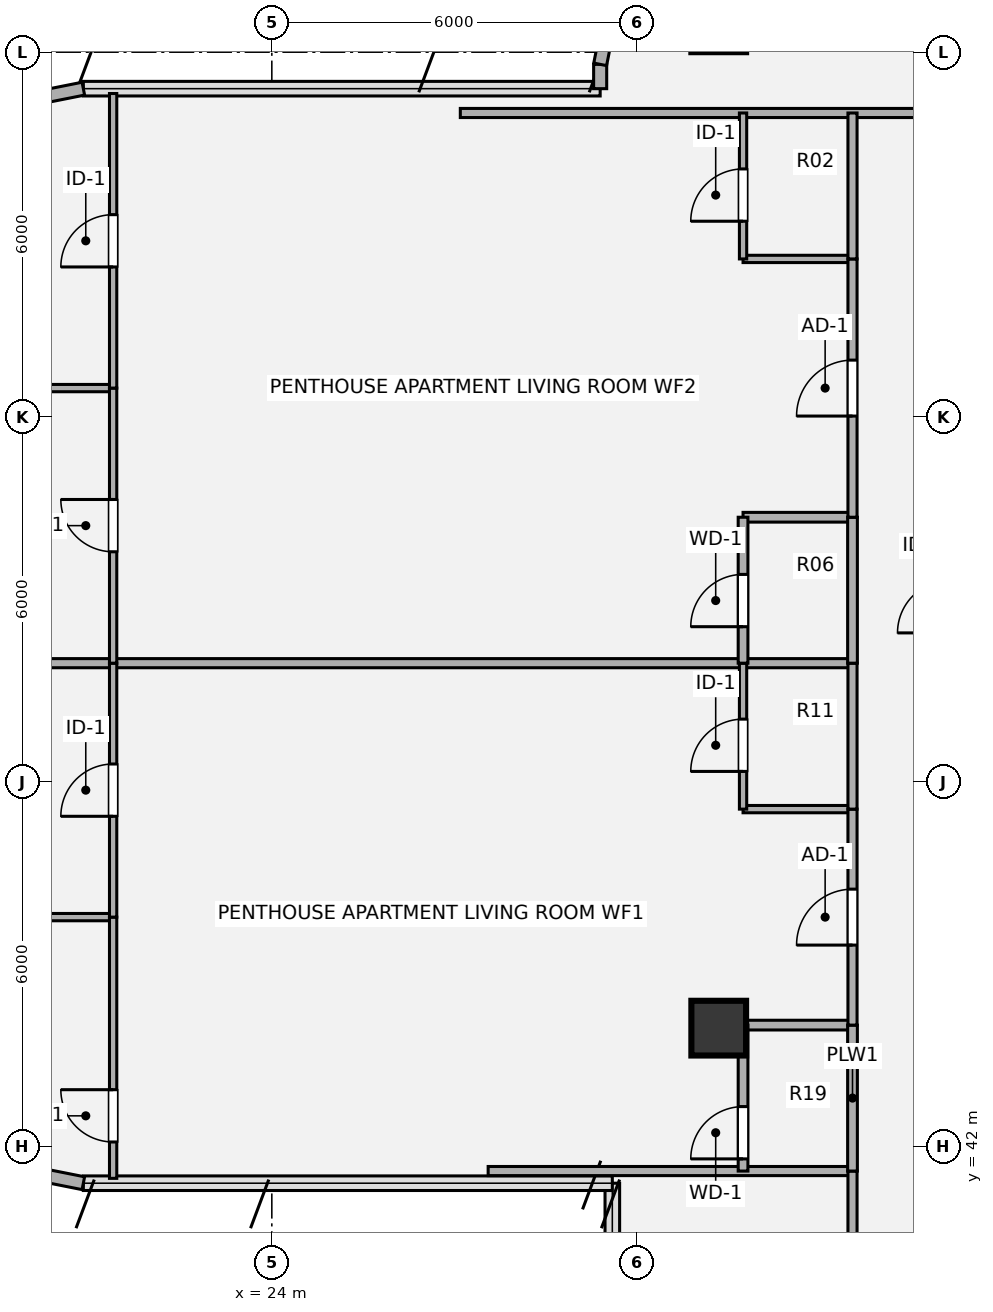
"""IFC4 building model, lengths in metres.
Left out: names, types, materials, properties, quantities, classifications, styles, units other than length and angle.
Written with IfcOpenShell. Run it as: python <this file> out.ifc"""

import sys

from ifc_helpers import new_model, si_unit, direction, frame, frame_2d, origin, origin_2d, place, context, subcontext, project, spatial, rectangle, hollow_circle, extrude, source, transform, mapped, element, fill, save


model = new_model("IFC4")
c1 = context("Model", 3, precision=1e-05, world=origin(), true_north=direction((0.0, 1.0)))
c2 = subcontext(c1, "Body", "Model", "MODEL_VIEW")
j1 = project(units=[si_unit("LENGTHUNIT", "METRE"), si_unit("PLANEANGLEUNIT", "RADIAN")], contexts=[c1])
p1 = place(None, origin())
s1 = spatial("IfcSite", under=j1, at=p1, CompositionType="ELEMENT")
p2 = place(p1, origin())
s2 = spatial("IfcBuilding", under=s1, at=p2, CompositionType="ELEMENT")
p3 = place(p2, frame((0.0, 0.0, 226.8)))
s3 = spatial("IfcBuildingStorey", under=s2, at=p3, CompositionType="ELEMENT", Elevation=226.8)
m1 = source(origin(), c2, "Body", "SweptSolid", [
    extrude(hollow_circle(Radius=0.45, WallThickness=0.032, at=origin_2d()), origin(), (0.0, 0.0, 1.0), 3.78),
])
p4 = place(p3, frame((31.35, 43.95, 0.0), z_axis=(0.0, 0.0, 1.0), x_axis=(1.0, 0.0, 0.0)))
e1 = element("IfcColumn", 1, at=p4, inside=s3, PredefinedType="COLUMN", context=c2, shape_type="MappedRepresentation", body=[
    mapped(m1, transform((0.0, 0.0, 0.0), x_axis=(1.0, 0.0, 0.0), y_axis=(0.0, 1.0, 0.0), z_axis=(0.0, 0.0, 1.0), scale=1.0)),
])
for number, where, z_axis, x_axis in (
    (2, (20.9, 41.4, 0.0), (0.0, 0.0, 1.0), (-0.981, 0.195, 0.0)),
    (3, (19.675, 59.156, 0.0), (0.0, 0.0, 1.0), (0.981, 0.195, 0.0)),
):
    element("IfcWall", number, at=place(p3, frame(where, z_axis=z_axis, x_axis=x_axis)), inside=s3, PredefinedType="SOLIDWALL", context=c2, shape_type="SweptSolid", body=[
        extrude(rectangle(XDim=1.249, YDim=0.215, at=frame_2d((0.624, 0.0))), origin(), (0.0, 0.0, 1.0), 3.53),
    ])
p5 = place(p3, frame((29.4, 59.4, 0.0), z_axis=(0.0, 0.0, 1.0), x_axis=(0.0, 1.0, 0.0)))
e4 = element("IfcWall", 4, at=p5, inside=s3, PredefinedType="SOLIDWALL", context=c2, shape_type="SweptSolid", body=[
    extrude(rectangle(XDim=0.4, YDim=0.215, at=frame_2d((0.2, 0.0))), origin(), (0.0, 0.0, 1.0), 3.53),
])
p6 = place(p3, frame((29.4, 59.8, 0.0), z_axis=(0.0, 0.0, 1.0), x_axis=(0.195190360752, 0.980765376158, 0.0)))
e5 = element("IfcWall", 5, at=p6, inside=s3, PredefinedType="SOLIDWALL", context=c2, shape_type="SweptSolid", body=[
    extrude(rectangle(XDim=1.014, YDim=0.215, at=frame_2d((0.507, 0.0))), origin(), (0.0, 0.0, 1.0), 3.53),
])
p7 = place(p3, frame((27.558, 41.6, 0.0), z_axis=(0.0, 0.0, 1.0), x_axis=(1.0, 0.0, 0.0)))
e6 = element("IfcWall", 6, at=p7, inside=s3, PredefinedType="PARTITIONING", context=c2, shape_type="SweptSolid", body=[
    extrude(rectangle(XDim=5.992, YDim=0.15, at=frame_2d((2.996, 0.0))), origin(), (0.0, 0.0, 1.0), 3.5),
])
p8 = place(p3, frame((31.75, 44.0, 0.0), z_axis=(0.0, 0.0, 1.0), x_axis=(1.0, 0.0, 0.0)))
e7 = element("IfcWall", 7, at=p8, inside=s3, PredefinedType="PLUMBINGWALL", context=c2, shape_type="SweptSolid", body=[
    extrude(rectangle(XDim=1.8, YDim=0.16, at=frame_2d((0.9, 0.0))), origin(), (0.0, 0.0, 1.0), 2.903),
])
p9 = place(p3, frame((17.78, 45.776, 0.0), z_axis=(0.0, 0.0, 1.0), x_axis=(1.0, 0.0, 0.0)))
e8 = element("IfcWall", 8, at=p9, inside=s3, PredefinedType="PARTITIONING", context=c2, shape_type="SweptSolid", body=[
    extrude(rectangle(XDim=3.61, YDim=0.12, at=frame_2d((1.805, 0.0))), origin(), (0.0, 0.0, 1.0), 2.982),
])
p10 = place(p3, frame((31.75, 47.552, 0.0), z_axis=(0.0, 0.0, 1.0), x_axis=(1.0, 0.0, 0.0)))
e9 = element("IfcWall", 9, at=p10, inside=s3, PredefinedType="PARTITIONING", context=c2, shape_type="SweptSolid", body=[
    extrude(rectangle(XDim=1.8, YDim=0.12, at=frame_2d((0.9, 0.0))), origin(), (0.0, 0.0, 1.0), 3.259),
])
p11 = place(p3, frame((17.78, 49.952, 0.0), z_axis=(0.0, 0.0, 1.0), x_axis=(1.0, 0.0, 0.0)))
e10 = element("IfcWall", 10, at=p11, inside=s3, PredefinedType="PARTITIONING", context=c2, shape_type="SweptSolid", body=[
    extrude(rectangle(XDim=15.77, YDim=0.15, at=frame_2d((7.885, 0.0))), origin(), (0.0, 0.0, 1.0), 2.982),
])
p12 = place(p3, frame((31.75, 52.352, 0.0), z_axis=(0.0, 0.0, 1.0), x_axis=(1.0, 0.0, 0.0)))
e11 = element("IfcWall", 11, at=p12, inside=s3, PredefinedType="PLUMBINGWALL", context=c2, shape_type="SweptSolid", body=[
    extrude(rectangle(XDim=1.8, YDim=0.16, at=frame_2d((0.9, 0.0))), origin(), (0.0, 0.0, 1.0), 3.259),
])
p13 = place(p3, frame((17.78, 54.476, 0.0), z_axis=(0.0, 0.0, 1.0), x_axis=(1.0, 0.0, 0.0)))
e12 = element("IfcWall", 12, at=p13, inside=s3, PredefinedType="PARTITIONING", context=c2, shape_type="SweptSolid", body=[
    extrude(rectangle(XDim=3.61, YDim=0.12, at=frame_2d((1.805, 0.0))), origin(), (0.0, 0.0, 1.0), 2.903),
])
p14 = place(p3, frame((31.75, 56.6, 0.0), z_axis=(0.0, 0.0, 1.0), x_axis=(1.0, 0.0, 0.0)))
e13 = element("IfcWall", 13, at=p14, inside=s3, PredefinedType="PARTITIONING", context=c2, shape_type="SweptSolid", body=[
    extrude(rectangle(XDim=1.8, YDim=0.12, at=frame_2d((0.9, 0.0))), origin(), (0.0, 0.0, 1.0), 3.259),
])
p15 = place(p3, frame((27.1, 59.0, 0.0), z_axis=(0.0, 0.0, 1.0), x_axis=(1.0, 0.0, 0.0)))
e14 = element("IfcWall", 14, at=p15, inside=s3, PredefinedType="PARTITIONING", context=c2, shape_type="SweptSolid", body=[
    extrude(rectangle(XDim=17.8, YDim=0.15, at=frame_2d((8.9, 0.0))), origin(), (0.0, 0.0, 1.0), 3.308),
])
p16 = place(p15, frame((8.375, 0.0, 0.0)))
e15 = element("IfcOpeningElement", 15, at=p16, cuts=e14, PredefinedType="OPENING", context=c2, shape_type="SweptSolid", body=[
    extrude(rectangle(XDim=1.05, YDim=2.1, at=origin_2d()), frame((0.525, 0.085, 1.05), z_axis=(0.0, -1.0, 0.0), x_axis=(1.0, 0.0, 0.0)), (0.0, 0.0, 1.0), 0.17),
])
p17 = place(p3, frame((21.39, 41.48, 0.0), z_axis=(0.0, 0.0, 1.0), x_axis=(0.0, 1.0, 0.0)))
e16 = element("IfcWall", 16, at=p17, inside=s3, PredefinedType="PARTITIONING", context=c2, shape_type="SweptSolid", body=[
    extrude(rectangle(XDim=4.296, YDim=0.12, at=frame_2d((2.148, 0.0))), origin(), (0.0, 0.0, 1.0), 3.5),
])
p18 = place(p17, frame((0.598, 0.0, 0.0)))
e17 = element("IfcOpeningElement", 17, at=p18, cuts=e16, PredefinedType="OPENING", context=c2, shape_type="SweptSolid", body=[
    extrude(rectangle(XDim=0.86, YDim=2.1, at=origin_2d()), frame((0.43, 0.07, 1.05), z_axis=(0.0, -1.0, 0.0), x_axis=(1.0, 0.0, 0.0)), (0.0, 0.0, 1.0), 0.14),
])
p19 = place(p3, frame((21.39, 45.776, 0.0), z_axis=(0.0, 0.0, 1.0), x_axis=(0.0, 1.0, 0.0)))
e18 = element("IfcWall", 18, at=p19, inside=s3, PredefinedType="PARTITIONING", context=c2, shape_type="SweptSolid", body=[
    extrude(rectangle(XDim=4.176, YDim=0.12, at=frame_2d((2.088, 0.0))), origin(), (0.0, 0.0, 1.0), 3.5),
])
p20 = place(p19, frame((1.658, 0.0, 0.0)))
e19 = element("IfcOpeningElement", 19, at=p20, cuts=e18, PredefinedType="OPENING", context=c2, shape_type="SweptSolid", body=[
    extrude(rectangle(XDim=0.86, YDim=2.1, at=origin_2d()), frame((0.43, 0.07, 1.05), z_axis=(0.0, -1.0, 0.0), x_axis=(1.0, 0.0, 0.0)), (0.0, 0.0, 1.0), 0.14),
])
p21 = place(p3, frame((21.39, 49.952, 0.0), z_axis=(0.0, 0.0, 1.0), x_axis=(0.0, 1.0, 0.0)))
e20 = element("IfcWall", 20, at=p21, inside=s3, PredefinedType="PARTITIONING", context=c2, shape_type="SweptSolid", body=[
    extrude(rectangle(XDim=4.524, YDim=0.12, at=frame_2d((2.262, 0.0))), origin(), (0.0, 0.0, 1.0), 3.5),
])
p22 = place(p21, frame((1.832, 0.0, 0.0)))
e21 = element("IfcOpeningElement", 21, at=p22, cuts=e20, PredefinedType="OPENING", context=c2, shape_type="SweptSolid", body=[
    extrude(rectangle(XDim=0.86, YDim=2.1, at=origin_2d()), frame((0.43, 0.07, 1.05), z_axis=(0.0, -1.0, 0.0), x_axis=(1.0, 0.0, 0.0)), (0.0, 0.0, 1.0), 0.14),
])
p23 = place(p3, frame((21.39, 54.476, 0.0), z_axis=(0.0, 0.0, 1.0), x_axis=(0.0, 1.0, 0.0)))
e22 = element("IfcWall", 22, at=p23, inside=s3, PredefinedType="PARTITIONING", context=c2, shape_type="SweptSolid", body=[
    extrude(rectangle(XDim=4.844, YDim=0.12, at=frame_2d((2.422, 0.0))), origin(), (0.0, 0.0, 1.0), 3.5),
])
p24 = place(p23, frame((1.992, 0.0, 0.0)))
e23 = element("IfcOpeningElement", 23, at=p24, cuts=e22, PredefinedType="OPENING", context=c2, shape_type="SweptSolid", body=[
    extrude(rectangle(XDim=0.86, YDim=2.1, at=origin_2d()), frame((0.43, 0.07, 1.05), z_axis=(0.0, -1.0, 0.0), x_axis=(1.0, 0.0, 0.0)), (0.0, 0.0, 1.0), 0.14),
])
p25 = place(p3, frame((31.75, 41.6, 0.0), z_axis=(0.0, 0.0, 1.0), x_axis=(0.0, 1.0, 0.0)))
e24 = element("IfcWall", 24, at=p25, inside=s3, PredefinedType="PLUMBINGWALL", context=c2, shape_type="SweptSolid", body=[
    extrude(rectangle(XDim=2.4, YDim=0.16, at=frame_2d((1.2, 0.0))), origin(), (0.0, 0.0, 1.0), 3.5),
])
p26 = place(p25, frame((0.2, 0.0, 0.0)))
e25 = element("IfcOpeningElement", 25, at=p26, cuts=e24, PredefinedType="OPENING", context=c2, shape_type="SweptSolid", body=[
    extrude(rectangle(XDim=0.86, YDim=2.1, at=origin_2d()), frame((0.43, 0.09, 1.05), z_axis=(0.0, -1.0, 0.0), x_axis=(1.0, 0.0, 0.0)), (0.0, 0.0, 1.0), 0.18),
])
p27 = place(p3, frame((31.75, 47.552, 0.0), z_axis=(0.0, 0.0, 1.0), x_axis=(0.0, 1.0, 0.0)))
e26 = element("IfcWall", 26, at=p27, inside=s3, PredefinedType="PARTITIONING", context=c2, shape_type="SweptSolid", body=[
    extrude(rectangle(XDim=2.4, YDim=0.12, at=frame_2d((1.2, 0.0))), origin(), (0.0, 0.0, 1.0), 3.5),
])
p28 = place(p27, frame((0.62, 0.0, 0.0)))
e27 = element("IfcOpeningElement", 27, at=p28, cuts=e26, PredefinedType="OPENING", context=c2, shape_type="SweptSolid", body=[
    extrude(rectangle(XDim=0.86, YDim=2.1, at=origin_2d()), frame((0.43, 0.07, 1.05), z_axis=(0.0, -1.0, 0.0), x_axis=(1.0, 0.0, 0.0)), (0.0, 0.0, 1.0), 0.14),
])
p29 = place(p3, frame((31.75, 49.952, 0.0), z_axis=(0.0, 0.0, 1.0), x_axis=(0.0, 1.0, 0.0)))
e28 = element("IfcWall", 28, at=p29, inside=s3, PredefinedType="PLUMBINGWALL", context=c2, shape_type="SweptSolid", body=[
    extrude(rectangle(XDim=2.4, YDim=0.16, at=frame_2d((1.2, 0.0))), origin(), (0.0, 0.0, 1.0), 3.5),
])
p30 = place(p29, frame((0.6, 0.0, 0.0)))
e29 = element("IfcOpeningElement", 29, at=p30, cuts=e28, PredefinedType="OPENING", context=c2, shape_type="SweptSolid", body=[
    extrude(rectangle(XDim=0.86, YDim=2.1, at=origin_2d()), frame((0.43, 0.09, 1.05), z_axis=(0.0, -1.0, 0.0), x_axis=(1.0, 0.0, 0.0)), (0.0, 0.0, 1.0), 0.18),
])
p31 = place(p3, frame((31.75, 56.6, 0.0), z_axis=(0.0, 0.0, 1.0), x_axis=(0.0, 1.0, 0.0)))
e30 = element("IfcWall", 30, at=p31, inside=s3, PredefinedType="PARTITIONING", context=c2, shape_type="SweptSolid", body=[
    extrude(rectangle(XDim=2.4, YDim=0.12, at=frame_2d((1.2, 0.0))), origin(), (0.0, 0.0, 1.0), 3.5),
])
p32 = place(p31, frame((0.62, 0.0, 0.0)))
e31 = element("IfcOpeningElement", 31, at=p32, cuts=e30, PredefinedType="OPENING", context=c2, shape_type="SweptSolid", body=[
    extrude(rectangle(XDim=0.86, YDim=2.1, at=origin_2d()), frame((0.43, 0.07, 1.05), z_axis=(0.0, -1.0, 0.0), x_axis=(1.0, 0.0, 0.0)), (0.0, 0.0, 1.0), 0.14),
])
p33 = place(p3, frame((33.55, 21.2, 0.0), z_axis=(0.0, 0.0, 1.0), x_axis=(0.0, 1.0, 0.0)))
e32 = element("IfcWall", 32, at=p33, inside=s3, PredefinedType="PARTITIONING", context=c2, shape_type="SweptSolid", body=[
    extrude(rectangle(XDim=20.4, YDim=0.15, at=frame_2d((10.2, 0.0))), origin(), (0.0, 0.0, 1.0), 3.5),
])
p34 = place(p33, frame((9.64, 0.0, 0.0)))
e33 = element("IfcOpeningElement", 33, at=p34, cuts=e32, PredefinedType="OPENING", context=c2, shape_type="SweptSolid", body=[
    extrude(rectangle(XDim=0.86, YDim=2.1, at=origin_2d()), frame((0.43, 0.085, 1.05), z_axis=(0.0, -1.0, 0.0), x_axis=(1.0, 0.0, 0.0)), (0.0, 0.0, 1.0), 0.17),
])
p35 = place(p3, frame((33.55, 41.6, 0.0), z_axis=(0.0, 0.0, 1.0), x_axis=(0.0, 1.0, 0.0)))
e34 = element("IfcWall", 34, at=p35, inside=s3, PredefinedType="PLUMBINGWALL", context=c2, shape_type="SweptSolid", body=[
    extrude(rectangle(XDim=2.4, YDim=0.16, at=frame_2d((1.2, 0.0))), origin(), (0.0, 0.0, 1.0), 3.5),
])
p36 = place(p3, frame((33.55, 44.0, 0.0), z_axis=(0.0, 0.0, 1.0), x_axis=(0.0, 1.0, 0.0)))
e35 = element("IfcWall", 35, at=p36, inside=s3, PredefinedType="PARTITIONING", context=c2, shape_type="SweptSolid", body=[
    extrude(rectangle(XDim=3.552, YDim=0.15, at=frame_2d((1.776, 0.0))), origin(), (0.0, 0.0, 1.0), 3.5),
])
p37 = place(p36, frame((1.316, 0.0, 0.0)))
e36 = element("IfcOpeningElement", 36, at=p37, cuts=e35, PredefinedType="OPENING", context=c2, shape_type="SweptSolid", body=[
    extrude(rectangle(XDim=0.92, YDim=2.1, at=origin_2d()), frame((0.46, 0.085, 1.05), z_axis=(0.0, -1.0, 0.0), x_axis=(1.0, 0.0, 0.0)), (0.0, 0.0, 1.0), 0.17),
])
p38 = place(p3, frame((33.55, 47.552, 0.0), z_axis=(0.0, 0.0, 1.0), x_axis=(0.0, 1.0, 0.0)))
e37 = element("IfcWall", 37, at=p38, inside=s3, PredefinedType="PARTITIONING", context=c2, shape_type="SweptSolid", body=[
    extrude(rectangle(XDim=2.4, YDim=0.15, at=frame_2d((1.2, 0.0))), origin(), (0.0, 0.0, 1.0), 3.5),
])
p39 = place(p3, frame((33.55, 49.952, 0.0), z_axis=(0.0, 0.0, 1.0), x_axis=(0.0, 1.0, 0.0)))
e38 = element("IfcWall", 38, at=p39, inside=s3, PredefinedType="PLUMBINGWALL", context=c2, shape_type="SweptSolid", body=[
    extrude(rectangle(XDim=2.4, YDim=0.16, at=frame_2d((1.2, 0.0))), origin(), (0.0, 0.0, 1.0), 3.5),
])
p40 = place(p3, frame((33.55, 52.352, 0.0), z_axis=(0.0, 0.0, 1.0), x_axis=(0.0, 1.0, 0.0)))
e39 = element("IfcWall", 39, at=p40, inside=s3, PredefinedType="PARTITIONING", context=c2, shape_type="SweptSolid", body=[
    extrude(rectangle(XDim=4.248, YDim=0.15, at=frame_2d((2.124, 0.0))), origin(), (0.0, 0.0, 1.0), 3.5),
])
p41 = place(p40, frame((1.664, 0.0, 0.0)))
e40 = element("IfcOpeningElement", 40, at=p41, cuts=e39, PredefinedType="OPENING", context=c2, shape_type="SweptSolid", body=[
    extrude(rectangle(XDim=0.92, YDim=2.1, at=origin_2d()), frame((0.46, 0.085, 1.05), z_axis=(0.0, -1.0, 0.0), x_axis=(1.0, 0.0, 0.0)), (0.0, 0.0, 1.0), 0.17),
])
p42 = place(p3, frame((33.55, 56.6, 0.0), z_axis=(0.0, 0.0, 1.0), x_axis=(0.0, 1.0, 0.0)))
e41 = element("IfcWall", 41, at=p42, inside=s3, PredefinedType="PARTITIONING", context=c2, shape_type="SweptSolid", body=[
    extrude(rectangle(XDim=2.4, YDim=0.15, at=frame_2d((1.2, 0.0))), origin(), (0.0, 0.0, 1.0), 3.5),
])
m2 = source(origin(), c2, "Body", "SweptSolid", [
    extrude(rectangle(XDim=0.86, YDim=2.1, at=origin_2d()), frame((0.43, 0.025, 1.05), z_axis=(0.0, -1.0, 0.0), x_axis=(1.0, 0.0, 0.0)), (0.0, 0.0, 1.0), 0.05),
])
p43 = place(p18, origin())
e42 = element("IfcDoor", 42, at=p43, inside=s3, OperationType="SINGLE_SWING_RIGHT", PredefinedType="DOOR", context=c2, shape_type="MappedRepresentation", body=[
    mapped(m2, transform((0.0, 0.0, 0.0), x_axis=(1.0, 0.0, 0.0), y_axis=(0.0, 1.0, 0.0), z_axis=(0.0, 0.0, 1.0), scale=1.0)),
])
fill(e17, e42)
p44 = place(p20, origin())
e43 = element("IfcDoor", 43, at=p44, inside=s3, OperationType="SINGLE_SWING_LEFT", PredefinedType="DOOR", context=c2, shape_type="MappedRepresentation", body=[
    mapped(m2, transform((0.0, 0.0, 0.0), x_axis=(1.0, 0.0, 0.0), y_axis=(0.0, 1.0, 0.0), z_axis=(0.0, 0.0, 1.0), scale=1.0)),
])
fill(e19, e43)
p45 = place(p22, origin())
e44 = element("IfcDoor", 44, at=p45, inside=s3, OperationType="SINGLE_SWING_RIGHT", PredefinedType="DOOR", context=c2, shape_type="MappedRepresentation", body=[
    mapped(m2, transform((0.0, 0.0, 0.0), x_axis=(1.0, 0.0, 0.0), y_axis=(0.0, 1.0, 0.0), z_axis=(0.0, 0.0, 1.0), scale=1.0)),
])
fill(e21, e44)
p46 = place(p24, origin())
e45 = element("IfcDoor", 45, at=p46, inside=s3, OperationType="SINGLE_SWING_LEFT", PredefinedType="DOOR", context=c2, shape_type="MappedRepresentation", body=[
    mapped(m2, transform((0.0, 0.0, 0.0), x_axis=(1.0, 0.0, 0.0), y_axis=(0.0, 1.0, 0.0), z_axis=(0.0, 0.0, 1.0), scale=1.0)),
])
fill(e23, e45)
m3 = source(origin(), c2, "Body", "SweptSolid", [
    extrude(rectangle(XDim=0.86, YDim=2.1, at=origin_2d()), frame((0.43, 0.025, 1.05), z_axis=(0.0, -1.0, 0.0), x_axis=(1.0, 0.0, 0.0)), (0.0, 0.0, 1.0), 0.05),
])
p47 = place(p26, origin())
e46 = element("IfcDoor", 46, at=p47, inside=s3, OperationType="SINGLE_SWING_LEFT", PredefinedType="DOOR", context=c2, shape_type="MappedRepresentation", body=[
    mapped(m3, transform((0.0, 0.0, 0.0), x_axis=(1.0, 0.0, 0.0), y_axis=(0.0, 1.0, 0.0), z_axis=(0.0, 0.0, 1.0), scale=1.0)),
])
fill(e25, e46)
p48 = place(p28, origin())
e47 = element("IfcDoor", 47, at=p48, inside=s3, OperationType="SINGLE_SWING_LEFT", PredefinedType="DOOR", context=c2, shape_type="MappedRepresentation", body=[
    mapped(m2, transform((0.0, 0.0, 0.0), x_axis=(1.0, 0.0, 0.0), y_axis=(0.0, 1.0, 0.0), z_axis=(0.0, 0.0, 1.0), scale=1.0)),
])
fill(e27, e47)
p49 = place(p30, origin())
e48 = element("IfcDoor", 48, at=p49, inside=s3, OperationType="SINGLE_SWING_LEFT", PredefinedType="DOOR", context=c2, shape_type="MappedRepresentation", body=[
    mapped(m3, transform((0.0, 0.0, 0.0), x_axis=(1.0, 0.0, 0.0), y_axis=(0.0, 1.0, 0.0), z_axis=(0.0, 0.0, 1.0), scale=1.0)),
])
fill(e29, e48)
p50 = place(p32, origin())
e49 = element("IfcDoor", 49, at=p50, inside=s3, OperationType="SINGLE_SWING_LEFT", PredefinedType="DOOR", context=c2, shape_type="MappedRepresentation", body=[
    mapped(m2, transform((0.0, 0.0, 0.0), x_axis=(1.0, 0.0, 0.0), y_axis=(0.0, 1.0, 0.0), z_axis=(0.0, 0.0, 1.0), scale=1.0)),
])
fill(e31, e49)
m4 = source(origin(), c2, "Body", "SweptSolid", [
    extrude(rectangle(XDim=0.92, YDim=2.1, at=origin_2d()), frame((0.46, 0.025, 1.05), z_axis=(0.0, -1.0, 0.0), x_axis=(1.0, 0.0, 0.0)), (0.0, 0.0, 1.0), 0.05),
])
p51 = place(p37, origin())
e50 = element("IfcDoor", 50, at=p51, inside=s3, OperationType="SINGLE_SWING_LEFT", PredefinedType="DOOR", context=c2, shape_type="MappedRepresentation", body=[
    mapped(m4, transform((0.0, 0.0, 0.0), x_axis=(1.0, 0.0, 0.0), y_axis=(0.0, 1.0, 0.0), z_axis=(0.0, 0.0, 1.0), scale=1.0)),
])
fill(e36, e50)
p52 = place(p41, origin())
e51 = element("IfcDoor", 51, at=p52, inside=s3, OperationType="SINGLE_SWING_LEFT", PredefinedType="DOOR", context=c2, shape_type="MappedRepresentation", body=[
    mapped(m4, transform((0.0, 0.0, 0.0), x_axis=(1.0, 0.0, 0.0), y_axis=(0.0, 1.0, 0.0), z_axis=(0.0, 0.0, 1.0), scale=1.0)),
])
fill(e40, e51)
save(model, sys.argv[1])
